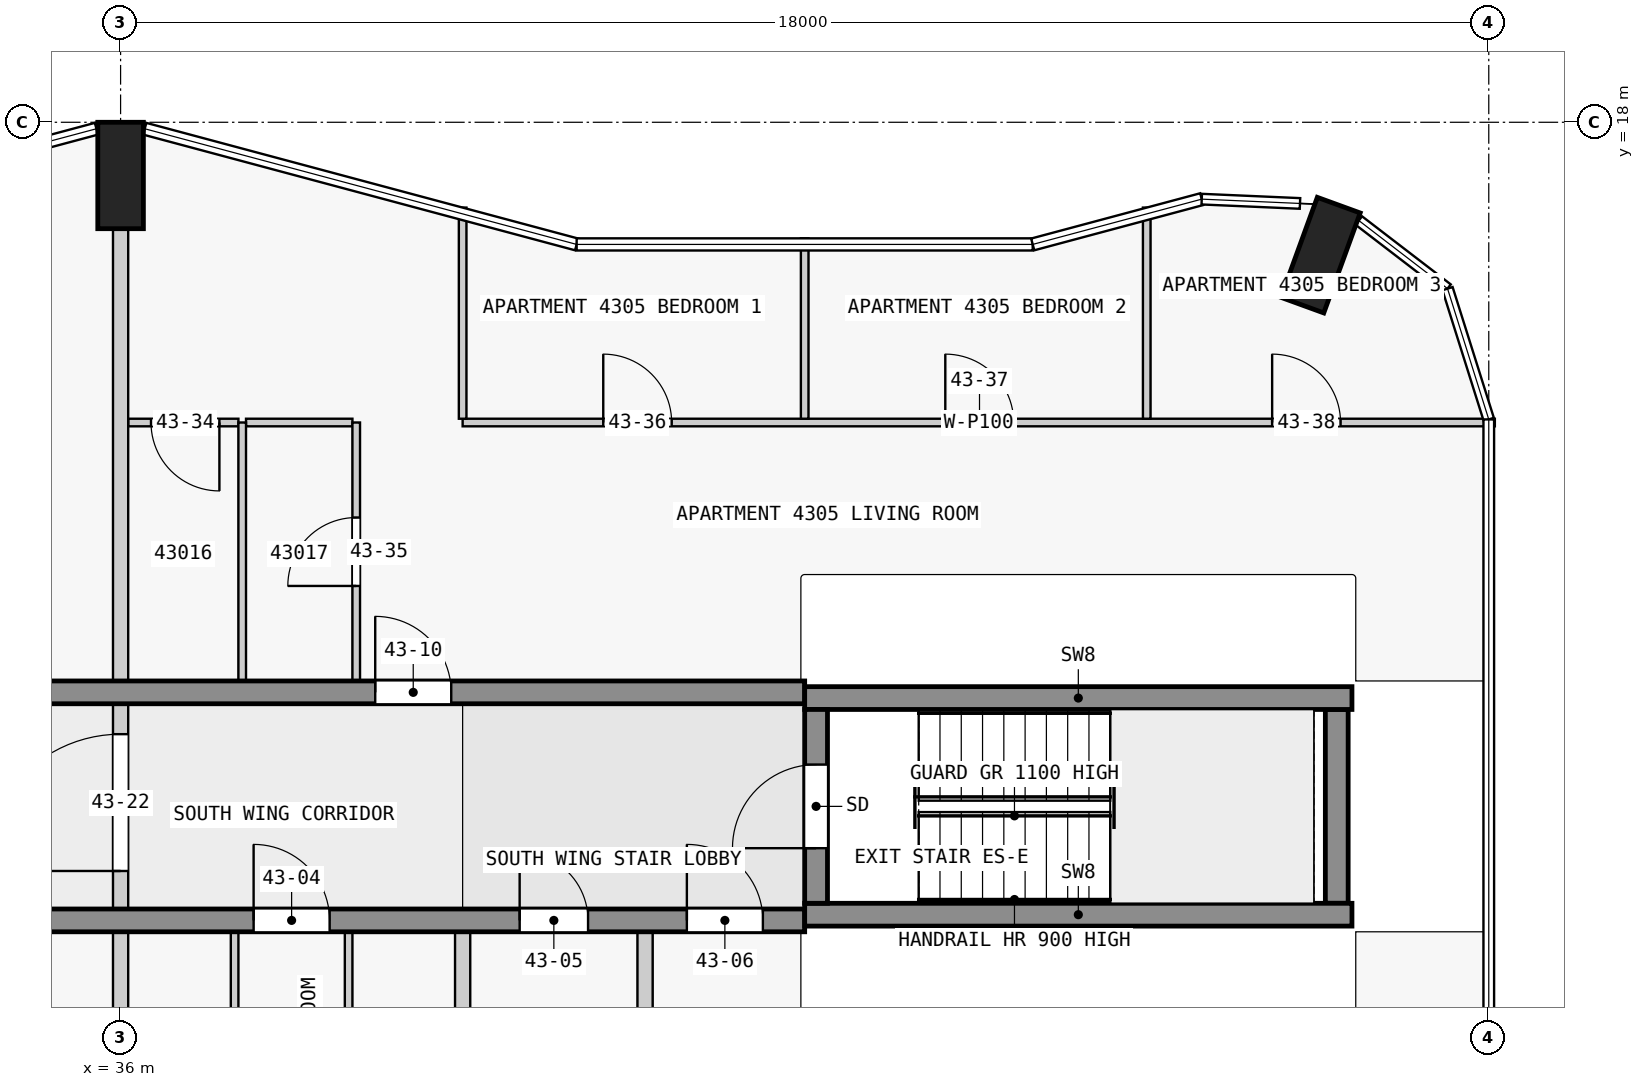
"""IFC4 building model, lengths in metres.
Left out: names, types, materials, properties, quantities, classifications, styles, units other than length and angle.
Written with IfcOpenShell. Run it as: python <this file> out.ifc"""

import sys

from ifc_helpers import new_model, si_unit, direction, frame, frame_2d, origin, origin_2d, place, context, subcontext, project, spatial, rectangle, extrude, element, fill, save


model = new_model("IFC4")
c1 = context("Model", 3, precision=1e-05, world=origin(), true_north=direction((0.0, 1.0)))
c2 = subcontext(c1, "Body", "Model", "MODEL_VIEW")
j1 = project(units=[si_unit("LENGTHUNIT", "METRE"), si_unit("PLANEANGLEUNIT", "RADIAN")], contexts=[c1])
p1 = place(None, origin())
s1 = spatial("IfcSite", under=j1, at=p1, CompositionType="ELEMENT")
p2 = place(p1, origin())
s2 = spatial("IfcBuilding", under=s1, at=p2, CompositionType="ELEMENT")
p3 = place(p2, frame((0.0, 0.0, 167.4)))
s3 = spatial("IfcBuildingStorey", under=s2, at=p3, CompositionType="ELEMENT", Elevation=167.4)
for number, where, z_axis, x_axis in (
    (1, (51.787, 16.252, 0.0), (0.0, 0.0, 1.0), (-0.94, 0.342, 0.0)),
    (2, (36.0, 17.3, 0.0), (0.0, 0.0, 1.0), (1.0, 0.0, 0.0)),
):
    element("IfcColumn", number, at=place(p3, frame(where, z_axis=z_axis, x_axis=x_axis)), inside=s3, PredefinedType="COLUMN", context=c2, shape_type="SweptSolid", body=[
        extrude(rectangle(XDim=0.6, YDim=1.4, at=origin_2d()), origin(), (0.0, 0.0, 1.0), 3.5),
    ])
p4 = place(p3, frame((45.15, 7.725, 0.0), z_axis=(0.0, 0.0, 1.0), x_axis=(0.0, 1.0, 0.0)))
e3 = element("IfcWall", 3, at=p4, inside=s3, PredefinedType="SHEAR", context=c2, shape_type="SweptSolid", body=[
    extrude(rectangle(XDim=2.55, YDim=0.3, at=frame_2d((1.275, 0.0))), origin(), (0.0, 0.0, 1.0), 3.5),
])
p5 = place(p4, frame((0.725, 0.0, 0.0)))
e4 = element("IfcOpeningElement", 4, at=p5, cuts=e3, PredefinedType="OPENING", context=c2, shape_type="SweptSolid", body=[
    extrude(rectangle(XDim=1.1, YDim=2.1, at=frame_2d((0.55, 1.05))), frame((0.0, 0.16, 0.0), z_axis=(0.0, -1.0, 0.0), x_axis=(1.0, 0.0, 0.0)), (0.0, 0.0, 1.0), 0.32),
])
p6 = place(p3, frame((52.0, 7.725, 0.0), z_axis=(0.0, 0.0, 1.0), x_axis=(0.0, 1.0, 0.0)))
e5 = element("IfcWall", 5, at=p6, inside=s3, PredefinedType="SHEAR", context=c2, shape_type="SweptSolid", body=[
    extrude(rectangle(XDim=2.55, YDim=0.3, at=frame_2d((1.275, 0.0))), origin(), (0.0, 0.0, 1.0), 3.5),
])
for number, where, z_axis, x_axis in (
    (6, (45.0, 7.575, 0.0), (0.0, 0.0, 1.0), (1.0, 0.0, 0.0)),
    (7, (45.0, 10.425, 0.0), (0.0, 0.0, 1.0), (1.0, 0.0, 0.0)),
):
    element("IfcWall", number, at=place(p3, frame(where, z_axis=z_axis, x_axis=x_axis)), inside=s3, PredefinedType="SHEAR", context=c2, shape_type="SweptSolid", body=[
        extrude(rectangle(XDim=7.2, YDim=0.3, at=frame_2d((3.6, 0.0))), origin(), (0.0, 0.0, 1.0), 3.5),
    ])
p7 = place(p3, frame((22.5, 7.5, 0.0), z_axis=(0.0, 0.0, 1.0), x_axis=(1.0, 0.0, 0.0)))
e8 = element("IfcWall", 8, at=p7, inside=s3, PredefinedType="SHEAR", context=c2, shape_type="SweptSolid", body=[
    extrude(rectangle(XDim=22.5, YDim=0.3, at=frame_2d((11.25, 0.0))), origin(), (0.0, 0.0, 1.0), 3.25),
])
p8 = place(p7, frame((1.75, 0.0, 0.0)))
e9 = element("IfcOpeningElement", 9, at=p8, cuts=e8, PredefinedType="OPENING", context=c2, shape_type="SweptSolid", body=[
    extrude(rectangle(XDim=1.0, YDim=2.1, at=frame_2d((0.5, 1.05))), frame((0.0, 0.16, 0.0), z_axis=(0.0, -1.0, 0.0), x_axis=(1.0, 0.0, 0.0)), (0.0, 0.0, 1.0), 0.32),
])
p9 = place(p7, frame((6.25, 0.0, 0.0)))
e10 = element("IfcOpeningElement", 10, at=p9, cuts=e8, PredefinedType="OPENING", context=c2, shape_type="SweptSolid", body=[
    extrude(rectangle(XDim=1.0, YDim=2.1, at=frame_2d((0.5, 1.05))), frame((0.0, 0.16, 0.0), z_axis=(0.0, -1.0, 0.0), x_axis=(1.0, 0.0, 0.0)), (0.0, 0.0, 1.0), 0.32),
])
p10 = place(p7, frame((10.75, 0.0, 0.0)))
e11 = element("IfcOpeningElement", 11, at=p10, cuts=e8, PredefinedType="OPENING", context=c2, shape_type="SweptSolid", body=[
    extrude(rectangle(XDim=1.0, YDim=2.1, at=frame_2d((0.5, 1.05))), frame((0.0, 0.16, 0.0), z_axis=(0.0, -1.0, 0.0), x_axis=(1.0, 0.0, 0.0)), (0.0, 0.0, 1.0), 0.32),
])
p11 = place(p7, frame((15.25, 0.0, 0.0)))
e12 = element("IfcOpeningElement", 12, at=p11, cuts=e8, PredefinedType="OPENING", context=c2, shape_type="SweptSolid", body=[
    extrude(rectangle(XDim=1.0, YDim=2.1, at=frame_2d((0.5, 1.05))), frame((0.0, 0.16, 0.0), z_axis=(0.0, -1.0, 0.0), x_axis=(1.0, 0.0, 0.0)), (0.0, 0.0, 1.0), 0.32),
])
p12 = place(p7, frame((18.75, 0.0, 0.0)))
e13 = element("IfcOpeningElement", 13, at=p12, cuts=e8, PredefinedType="OPENING", context=c2, shape_type="SweptSolid", body=[
    extrude(rectangle(XDim=0.9, YDim=2.1, at=frame_2d((0.45, 1.05))), frame((0.0, 0.16, 0.0), z_axis=(0.0, -1.0, 0.0), x_axis=(1.0, 0.0, 0.0)), (0.0, 0.0, 1.0), 0.32),
])
p13 = place(p7, frame((20.95, 0.0, 0.0)))
e14 = element("IfcOpeningElement", 14, at=p13, cuts=e8, PredefinedType="OPENING", context=c2, shape_type="SweptSolid", body=[
    extrude(rectangle(XDim=1.0, YDim=2.1, at=frame_2d((0.5, 1.05))), frame((0.0, 0.16, 0.0), z_axis=(0.0, -1.0, 0.0), x_axis=(1.0, 0.0, 0.0)), (0.0, 0.0, 1.0), 0.32),
])
p14 = place(p3, frame((22.5, 10.5, 0.0), z_axis=(0.0, 0.0, 1.0), x_axis=(1.0, 0.0, 0.0)))
e15 = element("IfcWall", 15, at=p14, inside=s3, PredefinedType="SHEAR", context=c2, shape_type="SweptSolid", body=[
    extrude(rectangle(XDim=22.5, YDim=0.3, at=frame_2d((11.25, 0.0))), origin(), (0.0, 0.0, 1.0), 3.25),
])
p15 = place(p14, frame((1.75, 0.0, 0.0)))
e16 = element("IfcOpeningElement", 16, at=p15, cuts=e15, PredefinedType="OPENING", context=c2, shape_type="SweptSolid", body=[
    extrude(rectangle(XDim=1.0, YDim=2.1, at=frame_2d((0.5, 1.05))), frame((0.0, 0.16, 0.0), z_axis=(0.0, -1.0, 0.0), x_axis=(1.0, 0.0, 0.0)), (0.0, 0.0, 1.0), 0.32),
])
p16 = place(p14, frame((6.25, 0.0, 0.0)))
e17 = element("IfcOpeningElement", 17, at=p16, cuts=e15, PredefinedType="OPENING", context=c2, shape_type="SweptSolid", body=[
    extrude(rectangle(XDim=1.0, YDim=2.1, at=frame_2d((0.5, 1.05))), frame((0.0, 0.16, 0.0), z_axis=(0.0, -1.0, 0.0), x_axis=(1.0, 0.0, 0.0)), (0.0, 0.0, 1.0), 0.32),
])
p17 = place(p14, frame((10.35, 0.0, 0.0)))
e18 = element("IfcOpeningElement", 18, at=p17, cuts=e15, PredefinedType="OPENING", context=c2, shape_type="SweptSolid", body=[
    extrude(rectangle(XDim=1.8, YDim=2.1, at=frame_2d((0.9, 1.05))), frame((0.0, 0.16, 0.0), z_axis=(0.0, -1.0, 0.0), x_axis=(1.0, 0.0, 0.0)), (0.0, 0.0, 1.0), 0.32),
])
p18 = place(p14, frame((16.85, 0.0, 0.0)))
e19 = element("IfcOpeningElement", 19, at=p18, cuts=e15, PredefinedType="OPENING", context=c2, shape_type="SweptSolid", body=[
    extrude(rectangle(XDim=1.0, YDim=2.1, at=frame_2d((0.5, 1.05))), frame((0.0, 0.16, 0.0), z_axis=(0.0, -1.0, 0.0), x_axis=(1.0, 0.0, 0.0)), (0.0, 0.0, 1.0), 0.32),
])
p19 = place(p3, frame((37.55, 14.05, 0.0), z_axis=(0.0, 0.0, 1.0), x_axis=(-1.0, 0.0, 0.0)))
e20 = element("IfcWall", 20, at=p19, inside=s3, PredefinedType="PARTITIONING", context=c2, shape_type="SweptSolid", body=[
    extrude(rectangle(XDim=1.45, YDim=0.1, at=frame_2d((0.725, 0.0))), origin(), (0.0, 0.0, 1.0), 3.25),
])
p20 = place(p19, frame((0.25, 0.0, 0.0)))
e21 = element("IfcOpeningElement", 21, at=p20, cuts=e20, PredefinedType="OPENING", context=c2, shape_type="SweptSolid", body=[
    extrude(rectangle(XDim=0.9, YDim=2.1, at=frame_2d((0.45, 1.05))), frame((0.0, 0.06, 0.0), z_axis=(0.0, -1.0, 0.0), x_axis=(1.0, 0.0, 0.0)), (0.0, 0.0, 1.0), 0.12),
])
p21 = place(p3, frame((39.05, 14.05, 0.0), z_axis=(0.0, 0.0, 1.0), x_axis=(-1.0, 0.0, 0.0)))
e22 = element("IfcWall", 22, at=p21, inside=s3, PredefinedType="PARTITIONING", context=c2, shape_type="SweptSolid", body=[
    extrude(rectangle(XDim=1.4, YDim=0.1, at=frame_2d((0.7, 0.0))), origin(), (0.0, 0.0, 1.0), 3.25),
])
p22 = place(p3, frame((40.5, 14.05, 0.0), z_axis=(0.0, 0.0, 1.0), x_axis=(1.0, 0.0, 0.0)))
e23 = element("IfcWall", 23, at=p22, inside=s3, PredefinedType="PARTITIONING", context=c2, shape_type="SweptSolid", body=[
    extrude(rectangle(XDim=13.58, YDim=0.1, at=frame_2d((6.79, 0.0))), origin(), (0.0, 0.0, 1.0), 3.25),
])
p23 = place(p22, frame((1.85, 0.0, 0.0)))
e24 = element("IfcOpeningElement", 24, at=p23, cuts=e23, PredefinedType="OPENING", context=c2, shape_type="SweptSolid", body=[
    extrude(rectangle(XDim=0.9, YDim=2.1, at=frame_2d((0.45, 1.05))), frame((0.0, 0.06, 0.0), z_axis=(0.0, -1.0, 0.0), x_axis=(1.0, 0.0, 0.0)), (0.0, 0.0, 1.0), 0.12),
])
p24 = place(p22, frame((6.35, 0.0, 0.0)))
e25 = element("IfcOpeningElement", 25, at=p24, cuts=e23, PredefinedType="OPENING", context=c2, shape_type="SweptSolid", body=[
    extrude(rectangle(XDim=0.9, YDim=2.1, at=frame_2d((0.45, 1.05))), frame((0.0, 0.06, 0.0), z_axis=(0.0, -1.0, 0.0), x_axis=(1.0, 0.0, 0.0)), (0.0, 0.0, 1.0), 0.12),
])
p25 = place(p22, frame((10.65, 0.0, 0.0)))
e26 = element("IfcOpeningElement", 26, at=p25, cuts=e23, PredefinedType="OPENING", context=c2, shape_type="SweptSolid", body=[
    extrude(rectangle(XDim=0.9, YDim=2.1, at=frame_2d((0.45, 1.05))), frame((0.0, 0.06, 0.0), z_axis=(0.0, -1.0, 0.0), x_axis=(1.0, 0.0, 0.0)), (0.0, 0.0, 1.0), 0.12),
])
for number, where, z_axis, x_axis in (
    (27, (36.0, 1.4, 0.0), (0.0, 0.0, 1.0), (0.0, 1.0, 0.0)),
    (28, (36.0, 10.65, 0.0), (0.0, 0.0, 1.0), (0.0, 1.0, 0.0)),
):
    element("IfcWall", number, at=place(p3, frame(where, z_axis=z_axis, x_axis=x_axis)), inside=s3, PredefinedType="PARTITIONING", context=c2, shape_type="SweptSolid", body=[
        extrude(rectangle(XDim=5.95, YDim=0.2, at=frame_2d((2.975, 0.0))), origin(), (0.0, 0.0, 1.0), 3.25),
    ])
p26 = place(p3, frame((37.5, 3.95, 0.0), z_axis=(0.0, 0.0, 1.0), x_axis=(0.0, 1.0, 0.0)))
e29 = element("IfcWall", 29, at=p26, inside=s3, PredefinedType="PARTITIONING", context=c2, shape_type="SweptSolid", body=[
    extrude(rectangle(XDim=3.4, YDim=0.1, at=frame_2d((1.7, 0.0))), origin(), (0.0, 0.0, 1.0), 3.25),
])
p27 = place(p26, frame((1.25, 0.0, 0.0)))
e30 = element("IfcOpeningElement", 30, at=p27, cuts=e29, PredefinedType="OPENING", context=c2, shape_type="SweptSolid", body=[
    extrude(rectangle(XDim=0.9, YDim=2.1, at=frame_2d((0.45, 1.05))), frame((0.0, 0.06, 0.0), z_axis=(0.0, -1.0, 0.0), x_axis=(1.0, 0.0, 0.0)), (0.0, 0.0, 1.0), 0.12),
])
p28 = place(p3, frame((37.6, 10.65, 0.0), z_axis=(0.0, 0.0, 1.0), x_axis=(0.0, 1.0, 0.0)))
e31 = element("IfcWall", 31, at=p28, inside=s3, PredefinedType="PARTITIONING", context=c2, shape_type="SweptSolid", body=[
    extrude(rectangle(XDim=3.4, YDim=0.1, at=frame_2d((1.7, 0.0))), origin(), (0.0, 0.0, 1.0), 3.25),
])
p29 = place(p3, frame((39.0, 7.35, 0.0), z_axis=(0.0, 0.0, 1.0), x_axis=(0.0, -1.0, 0.0)))
e32 = element("IfcWall", 32, at=p29, inside=s3, PredefinedType="PARTITIONING", context=c2, shape_type="SweptSolid", body=[
    extrude(rectangle(XDim=3.4, YDim=0.1, at=frame_2d((1.7, 0.0))), origin(), (0.0, 0.0, 1.0), 3.25),
])
p30 = place(p29, frame((1.25, 0.0, 0.0)))
e33 = element("IfcOpeningElement", 33, at=p30, cuts=e32, PredefinedType="OPENING", context=c2, shape_type="SweptSolid", body=[
    extrude(rectangle(XDim=0.9, YDim=2.1, at=frame_2d((0.45, 1.05))), frame((0.0, 0.06, 0.0), z_axis=(0.0, -1.0, 0.0), x_axis=(1.0, 0.0, 0.0)), (0.0, 0.0, 1.0), 0.12),
])
p31 = place(p3, frame((39.1, 10.65, 0.0), z_axis=(0.0, 0.0, 1.0), x_axis=(0.0, 1.0, 0.0)))
e34 = element("IfcWall", 34, at=p31, inside=s3, PredefinedType="PARTITIONING", context=c2, shape_type="SweptSolid", body=[
    extrude(rectangle(XDim=3.4, YDim=0.1, at=frame_2d((1.7, 0.0))), origin(), (0.0, 0.0, 1.0), 3.25),
])
p32 = place(p31, frame((1.25, 0.0, 0.0)))
e35 = element("IfcOpeningElement", 35, at=p32, cuts=e34, PredefinedType="OPENING", context=c2, shape_type="SweptSolid", body=[
    extrude(rectangle(XDim=0.9, YDim=2.1, at=frame_2d((0.45, 1.05))), frame((0.0, 0.06, 0.0), z_axis=(0.0, -1.0, 0.0), x_axis=(1.0, 0.0, 0.0)), (0.0, 0.0, 1.0), 0.12),
])
p33 = place(p3, frame((40.5, 16.878, 0.0), z_axis=(0.0, 0.0, 1.0), x_axis=(0.0, -1.0, 0.0)))
e36 = element("IfcWall", 36, at=p33, inside=s3, PredefinedType="PARTITIONING", context=c2, shape_type="SweptSolid", body=[
    extrude(rectangle(XDim=2.778, YDim=0.1, at=frame_2d((1.389, 0.0))), origin(), (0.0, 0.0, 1.0), 3.25),
])
for number, where, z_axis, x_axis in (
    (37, (40.5, 3.95, 0.0), (0.0, 0.0, 1.0), (0.0, 1.0, 0.0)),
    (38, (42.9, 3.95, 0.0), (0.0, 0.0, 1.0), (0.0, 1.0, 0.0)),
):
    element("IfcWall", number, at=place(p3, frame(where, z_axis=z_axis, x_axis=x_axis)), inside=s3, PredefinedType="PARTITIONING", context=c2, shape_type="SweptSolid", body=[
        extrude(rectangle(XDim=3.4, YDim=0.2, at=frame_2d((1.7, 0.0))), origin(), (0.0, 0.0, 1.0), 3.25),
    ])
p34 = place(p3, frame((45.0, 14.1, 0.0), z_axis=(0.0, 0.0, 1.0), x_axis=(0.0, 1.0, 0.0)))
e39 = element("IfcWall", 39, at=p34, inside=s3, PredefinedType="PARTITIONING", context=c2, shape_type="SweptSolid", body=[
    extrude(rectangle(XDim=2.373, YDim=0.1, at=frame_2d((1.187, 0.0))), origin(), (0.0, 0.0, 1.0), 3.25),
])
p35 = place(p3, frame((49.5, 14.1, 0.0), z_axis=(0.0, 0.0, 1.0), x_axis=(0.0, 1.0, 0.0)))
e40 = element("IfcWall", 40, at=p35, inside=s3, PredefinedType="PARTITIONING", context=c2, shape_type="SweptSolid", body=[
    extrude(rectangle(XDim=2.778, YDim=0.1, at=frame_2d((1.389, 0.0))), origin(), (0.0, 0.0, 1.0), 3.25),
])
p36 = place(p3, frame((36.0, 7.45, 0.0), z_axis=(0.0, 0.0, 1.0), x_axis=(0.0, 1.0, 0.0)))
e41 = element("IfcWall", 41, at=p36, inside=s3, PredefinedType="PARTITIONING", context=c2, shape_type="SweptSolid", body=[
    extrude(rectangle(XDim=3.1, YDim=0.2, at=frame_2d((1.55, 0.0))), origin(), (0.0, 0.0, 1.0), 3.25),
])
p37 = place(p36, frame((0.7, 0.0, 0.0)))
e42 = element("IfcOpeningElement", 42, at=p37, cuts=e41, PredefinedType="OPENING", context=c2, shape_type="SweptSolid", body=[
    extrude(rectangle(XDim=1.8, YDim=2.1, at=frame_2d((0.9, 1.05))), frame((0.0, 0.11, 0.0), z_axis=(0.0, -1.0, 0.0), x_axis=(1.0, 0.0, 0.0)), (0.0, 0.0, 1.0), 0.22),
])
p38 = place(p5, origin())
e43 = element("IfcDoor", 43, at=p38, inside=s3, OperationType="SINGLE_SWING_LEFT", PredefinedType="DOOR", context=c2, shape_type="SweptSolid", body=[
    extrude(rectangle(XDim=1.1, YDim=2.1, at=frame_2d((0.55, 1.05))), frame((0.0, 0.025, 0.0), z_axis=(0.0, -1.0, 0.0), x_axis=(1.0, 0.0, 0.0)), (0.0, 0.0, 1.0), 0.05),
])
fill(e4, e43)
p39 = place(p11, origin())
e44 = element("IfcDoor", 44, at=p39, inside=s3, OperationType="SINGLE_SWING_RIGHT", PredefinedType="DOOR", context=c2, shape_type="SweptSolid", body=[
    extrude(rectangle(XDim=1.0, YDim=2.1, at=frame_2d((0.5, 1.05))), frame((0.0, 0.025, 0.0), z_axis=(0.0, -1.0, 0.0), x_axis=(1.0, 0.0, 0.0)), (0.0, 0.0, 1.0), 0.05),
])
fill(e12, e44)
p40 = place(p12, origin())
e45 = element("IfcDoor", 45, at=p40, inside=s3, OperationType="SINGLE_SWING_RIGHT", PredefinedType="DOOR", context=c2, shape_type="SweptSolid", body=[
    extrude(rectangle(XDim=0.9, YDim=2.1, at=frame_2d((0.45, 1.05))), frame((0.0, 0.025, 0.0), z_axis=(0.0, -1.0, 0.0), x_axis=(1.0, 0.0, 0.0)), (0.0, 0.0, 1.0), 0.05),
])
fill(e13, e45)
p41 = place(p13, origin())
e46 = element("IfcDoor", 46, at=p41, inside=s3, OperationType="SINGLE_SWING_RIGHT", PredefinedType="DOOR", context=c2, shape_type="SweptSolid", body=[
    extrude(rectangle(XDim=1.0, YDim=2.1, at=frame_2d((0.5, 1.05))), frame((0.0, 0.025, 0.0), z_axis=(0.0, -1.0, 0.0), x_axis=(1.0, 0.0, 0.0)), (0.0, 0.0, 1.0), 0.05),
])
fill(e14, e46)
p42 = place(p18, origin())
e47 = element("IfcDoor", 47, at=p42, inside=s3, OperationType="SINGLE_SWING_RIGHT", PredefinedType="DOOR", context=c2, shape_type="SweptSolid", body=[
    extrude(rectangle(XDim=1.0, YDim=2.1, at=frame_2d((0.5, 1.05))), frame((0.0, 0.025, 0.0), z_axis=(0.0, -1.0, 0.0), x_axis=(1.0, 0.0, 0.0)), (0.0, 0.0, 1.0), 0.05),
])
fill(e19, e47)
p43 = place(p37, origin())
e48 = element("IfcDoor", 48, at=p43, inside=s3, OperationType="SINGLE_SWING_RIGHT", PredefinedType="DOOR", context=c2, shape_type="SweptSolid", body=[
    extrude(rectangle(XDim=1.8, YDim=2.1, at=frame_2d((0.9, 1.05))), frame((0.0, 0.025, 0.0), z_axis=(0.0, -1.0, 0.0), x_axis=(1.0, 0.0, 0.0)), (0.0, 0.0, 1.0), 0.05),
])
fill(e42, e48)
p44 = place(p20, origin())
e49 = element("IfcDoor", 49, at=p44, inside=s3, OperationType="SINGLE_SWING_LEFT", PredefinedType="DOOR", context=c2, shape_type="SweptSolid", body=[
    extrude(rectangle(XDim=0.9, YDim=2.1, at=frame_2d((0.45, 1.05))), frame((0.0, 0.025, 0.0), z_axis=(0.0, -1.0, 0.0), x_axis=(1.0, 0.0, 0.0)), (0.0, 0.0, 1.0), 0.05),
])
fill(e21, e49)
p45 = place(p32, origin())
e50 = element("IfcDoor", 50, at=p45, inside=s3, OperationType="SINGLE_SWING_LEFT", PredefinedType="DOOR", context=c2, shape_type="SweptSolid", body=[
    extrude(rectangle(XDim=0.9, YDim=2.1, at=frame_2d((0.45, 1.05))), frame((0.0, 0.025, 0.0), z_axis=(0.0, -1.0, 0.0), x_axis=(1.0, 0.0, 0.0)), (0.0, 0.0, 1.0), 0.05),
])
fill(e35, e50)
p46 = place(p23, origin())
e51 = element("IfcDoor", 51, at=p46, inside=s3, OperationType="SINGLE_SWING_LEFT", PredefinedType="DOOR", context=c2, shape_type="SweptSolid", body=[
    extrude(rectangle(XDim=0.9, YDim=2.1, at=frame_2d((0.45, 1.05))), frame((0.0, 0.025, 0.0), z_axis=(0.0, -1.0, 0.0), x_axis=(1.0, 0.0, 0.0)), (0.0, 0.0, 1.0), 0.05),
])
fill(e24, e51)
p47 = place(p24, origin())
e52 = element("IfcDoor", 52, at=p47, inside=s3, OperationType="SINGLE_SWING_RIGHT", PredefinedType="DOOR", context=c2, shape_type="SweptSolid", body=[
    extrude(rectangle(XDim=0.9, YDim=2.1, at=frame_2d((0.45, 1.05))), frame((0.0, 0.025, 0.0), z_axis=(0.0, -1.0, 0.0), x_axis=(1.0, 0.0, 0.0)), (0.0, 0.0, 1.0), 0.05),
])
fill(e25, e52)
p48 = place(p25, origin())
e53 = element("IfcDoor", 53, at=p48, inside=s3, OperationType="SINGLE_SWING_RIGHT", PredefinedType="DOOR", context=c2, shape_type="SweptSolid", body=[
    extrude(rectangle(XDim=0.9, YDim=2.1, at=frame_2d((0.45, 1.05))), frame((0.0, 0.025, 0.0), z_axis=(0.0, -1.0, 0.0), x_axis=(1.0, 0.0, 0.0)), (0.0, 0.0, 1.0), 0.05),
])
fill(e26, e53)
save(model, sys.argv[1])
